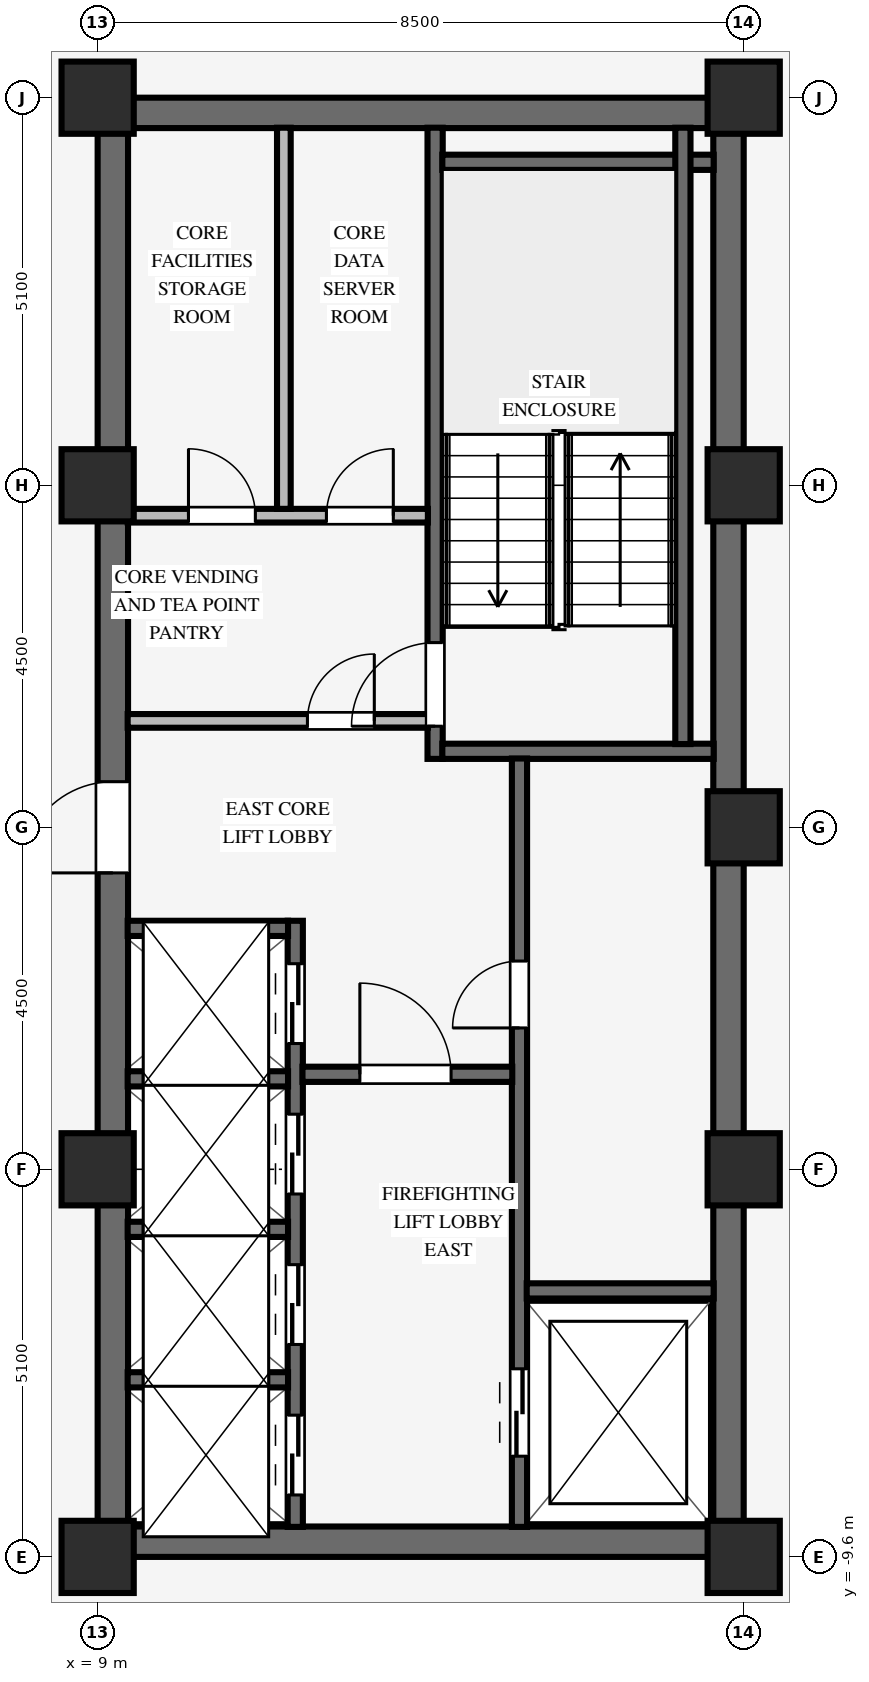
"""IFC4 building model, lengths in metres.
Left out: names, types, materials, properties, quantities, classifications, styles, units other than length and angle.
Written with IfcOpenShell. Run it as: python <this file> out.ifc"""

import sys

from ifc_helpers import new_model, si_unit, direction, frame, frame_2d, origin, origin_2d, place, context, subcontext, project, spatial, rectangle, extrude, source, transform, mapped, element, fill, save


model = new_model("IFC4")
c1 = context("Model", 3, precision=1e-05, world=origin(), true_north=direction((0.0, 1.0)))
c2 = subcontext(c1, "Body", "Model", "MODEL_VIEW")
j1 = project(units=[si_unit("LENGTHUNIT", "METRE"), si_unit("PLANEANGLEUNIT", "RADIAN")], contexts=[c1])
p1 = place(None, origin())
s1 = spatial("IfcSite", under=j1, at=p1, CompositionType="ELEMENT")
p2 = place(p1, origin())
s2 = spatial("IfcBuilding", under=s1, at=p2, CompositionType="ELEMENT")
p3 = place(p2, frame((0.0, 0.0, 174.95)))
s3 = spatial("IfcBuildingStorey", under=s2, at=p3, CompositionType="ELEMENT", Elevation=174.95)
for number, where, z_axis, x_axis in (
    (1, (9.0, -9.4, 0.0), (0.0, 0.0, 1.0), (1.0, 0.0, 0.0)),
    (2, (9.0, 9.4, 0.0), (0.0, 0.0, 1.0), (1.0, 0.0, 0.0)),
):
    element("IfcWall", number, at=place(p3, frame(where, z_axis=z_axis, x_axis=x_axis)), inside=s3, PredefinedType="SHEAR", context=c2, shape_type="SweptSolid", body=[
        extrude(rectangle(XDim=8.5, YDim=0.4, at=frame_2d((4.25, 0.0))), origin(), (0.0, 0.0, 1.0), 3.37),
    ])
p4 = place(p3, frame((9.2, -9.205, 0.0), z_axis=(0.0, 0.0, 1.0), x_axis=(0.0, 1.0, 0.0)))
e3 = element("IfcWall", 3, at=p4, inside=s3, PredefinedType="SHEAR", context=c2, shape_type="SweptSolid", body=[
    extrude(rectangle(XDim=18.41, YDim=0.4, at=frame_2d((9.205, 0.0))), origin(), (0.0, 0.0, 1.0), 3.37),
])
p5 = place(p4, frame((8.605, 0.0, 0.0)))
e4 = element("IfcOpeningElement", 4, at=p5, cuts=e3, PredefinedType="OPENING", context=c2, shape_type="SweptSolid", body=[
    extrude(rectangle(XDim=1.2, YDim=2.15, at=frame_2d((0.6, 1.075))), frame((0.0, 0.21, 0.0), z_axis=(0.0, -1.0, 0.0), x_axis=(1.0, 0.0, 0.0)), (0.0, 0.0, 1.0), 0.42),
])
p6 = place(p3, frame((17.3, -9.205, 0.0), z_axis=(0.0, 0.0, 1.0), x_axis=(0.0, 1.0, 0.0)))
e5 = element("IfcWall", 5, at=p6, inside=s3, PredefinedType="SHEAR", context=c2, shape_type="SweptSolid", body=[
    extrude(rectangle(XDim=18.41, YDim=0.4, at=frame_2d((9.205, 0.0))), origin(), (0.0, 0.0, 1.0), 3.37),
])
for number, where, z_axis, x_axis in (
    (6, (9.0, -9.6, 0.0), (0.0, 0.0, 1.0), (1.0, 0.0, 0.0)),
    (7, (9.0, -4.5, 0.0), (0.0, 0.0, 1.0), (1.0, 0.0, 0.0)),
    (8, (9.0, 4.5, 0.0), (0.0, 0.0, 1.0), (1.0, 0.0, 0.0)),
    (9, (9.0, 9.6, 0.0), (0.0, 0.0, 1.0), (1.0, 0.0, 0.0)),
    (10, (17.5, -9.6, 0.0), (0.0, 0.0, 1.0), (1.0, 0.0, 0.0)),
    (11, (17.5, -4.5, 0.0), (0.0, 0.0, 1.0), (1.0, 0.0, 0.0)),
    (12, (17.5, 4.5, 0.0), (0.0, 0.0, 1.0), (1.0, 0.0, 0.0)),
    (13, (17.5, 9.6, 0.0), (0.0, 0.0, 1.0), (1.0, 0.0, 0.0)),
    (14, (17.5, 0.0, 0.0), (0.0, 0.0, 1.0), (1.0, 0.0, 0.0)),
):
    element("IfcColumn", number, at=place(p3, frame(where, z_axis=z_axis, x_axis=x_axis)), inside=s3, PredefinedType="COLUMN", context=c2, shape_type="SweptSolid", body=[
        extrude(rectangle(XDim=0.95, YDim=0.95, at=origin_2d()), origin(), (0.0, 0.0, 1.0), 3.37),
    ])
p7 = place(p3, frame((13.44, 0.9, 0.0), z_axis=(0.0, 0.0, 1.0), x_axis=(0.0, 1.0, 0.0)))
e15 = element("IfcWall", 15, at=p7, inside=s3, PredefinedType="SHEAR", context=c2, shape_type="SweptSolid", body=[
    extrude(rectangle(XDim=8.305, YDim=0.2, at=frame_2d((4.153, 0.0))), origin(), (0.0, 0.0, 1.0), 3.37),
])
p8 = place(p7, frame((0.43, 0.0, 0.0)))
e16 = element("IfcOpeningElement", 16, at=p8, cuts=e15, PredefinedType="OPENING", context=c2, shape_type="SweptSolid", body=[
    extrude(rectangle(XDim=1.1, YDim=2.15, at=frame_2d((0.55, 1.075))), frame((0.0, 0.11, 0.0), z_axis=(0.0, -1.0, 0.0), x_axis=(1.0, 0.0, 0.0)), (0.0, 0.0, 1.0), 0.22),
])
for number, where, z_axis, x_axis in (
    (17, (13.535, 1.0, 0.0), (0.0, 0.0, 1.0), (1.0, 0.0, 0.0)),
    (18, (13.535, 8.75, 0.0), (0.0, 0.0, 1.0), (1.0, 0.0, 0.0)),
):
    element("IfcWall", number, at=place(p3, frame(where, z_axis=z_axis, x_axis=x_axis)), inside=s3, PredefinedType="SHEAR", context=c2, shape_type="SweptSolid", body=[
        extrude(rectangle(XDim=3.57, YDim=0.2, at=frame_2d((1.785, 0.0))), origin(), (0.0, 0.0, 1.0), 3.37),
    ])
p9 = place(p3, frame((16.7, 1.095, 0.0), z_axis=(0.0, 0.0, 1.0), x_axis=(0.0, 1.0, 0.0)))
e19 = element("IfcWall", 19, at=p9, inside=s3, PredefinedType="SHEAR", context=c2, shape_type="SweptSolid", body=[
    extrude(rectangle(XDim=8.11, YDim=0.2, at=frame_2d((4.055, 0.0))), origin(), (0.0, 0.0, 1.0), 3.37),
])
p10 = place(p3, frame((14.55, -9.205, 0.0), z_axis=(0.0, 0.0, 1.0), x_axis=(0.0, 1.0, 0.0)))
e20 = element("IfcWall", 20, at=p10, inside=s3, PredefinedType="SHEAR", context=c2, shape_type="SweptSolid", body=[
    extrude(rectangle(XDim=10.11, YDim=0.2, at=frame_2d((5.055, 0.0))), origin(), (0.0, 0.0, 1.0), 3.37),
])
p11 = place(p10, frame((6.565, 0.0, 0.0)))
e21 = element("IfcOpeningElement", 21, at=p11, cuts=e20, PredefinedType="OPENING", context=c2, shape_type="SweptSolid", body=[
    extrude(rectangle(XDim=0.88, YDim=2.1, at=frame_2d((0.44, 1.05))), frame((0.0, 0.11, 0.0), z_axis=(0.0, -1.0, 0.0), x_axis=(1.0, 0.0, 0.0)), (0.0, 0.0, 1.0), 0.22),
])
p12 = place(p10, frame((0.93, 0.0, 0.0)))
e22 = element("IfcOpeningElement", 22, at=p12, cuts=e20, PredefinedType="OPENING", context=c2, shape_type="SweptSolid", body=[
    extrude(rectangle(XDim=1.15, YDim=2.15, at=frame_2d((0.575, 1.075))), frame((0.0, 0.11, 0.0), z_axis=(0.0, -1.0, 0.0), x_axis=(1.0, 0.0, 0.0)), (0.0, 0.0, 1.0), 0.22),
])
p13 = place(p3, frame((14.645, -6.1, 0.0), z_axis=(0.0, 0.0, 1.0), x_axis=(1.0, 0.0, 0.0)))
e23 = element("IfcWall", 23, at=p13, inside=s3, PredefinedType="SHEAR", context=c2, shape_type="SweptSolid", body=[
    extrude(rectangle(XDim=2.46, YDim=0.2, at=frame_2d((1.23, 0.0))), origin(), (0.0, 0.0, 1.0), 3.37),
])
p14 = place(p3, frame((11.6, -9.205, 0.0), z_axis=(0.0, 0.0, 1.0), x_axis=(0.0, 1.0, 0.0)))
e24 = element("IfcWall", 24, at=p14, inside=s3, PredefinedType="SHEAR", context=c2, shape_type="SweptSolid", body=[
    extrude(rectangle(XDim=7.975, YDim=0.2, at=frame_2d((3.988, 0.0))), origin(), (0.0, 0.0, 1.0), 3.37),
])
p15 = place(p14, frame((0.42, 0.0, 0.0)))
e25 = element("IfcOpeningElement", 25, at=p15, cuts=e24, PredefinedType="OPENING", context=c2, shape_type="SweptSolid", body=[
    extrude(rectangle(XDim=1.05, YDim=2.15, at=frame_2d((0.525, 1.075))), frame((0.0, 0.11, 0.0), z_axis=(0.0, -1.0, 0.0), x_axis=(1.0, 0.0, 0.0)), (0.0, 0.0, 1.0), 0.22),
])
p16 = place(p14, frame((2.4, 0.0, 0.0)))
e26 = element("IfcOpeningElement", 26, at=p16, cuts=e24, PredefinedType="OPENING", context=c2, shape_type="SweptSolid", body=[
    extrude(rectangle(XDim=1.05, YDim=2.15, at=frame_2d((0.525, 1.075))), frame((0.0, 0.11, 0.0), z_axis=(0.0, -1.0, 0.0), x_axis=(1.0, 0.0, 0.0)), (0.0, 0.0, 1.0), 0.22),
])
p17 = place(p14, frame((4.38, 0.0, 0.0)))
e27 = element("IfcOpeningElement", 27, at=p17, cuts=e24, PredefinedType="OPENING", context=c2, shape_type="SweptSolid", body=[
    extrude(rectangle(XDim=1.05, YDim=2.15, at=frame_2d((0.525, 1.075))), frame((0.0, 0.11, 0.0), z_axis=(0.0, -1.0, 0.0), x_axis=(1.0, 0.0, 0.0)), (0.0, 0.0, 1.0), 0.22),
])
p18 = place(p14, frame((6.36, 0.0, 0.0)))
e28 = element("IfcOpeningElement", 28, at=p18, cuts=e24, PredefinedType="OPENING", context=c2, shape_type="SweptSolid", body=[
    extrude(rectangle(XDim=1.05, YDim=2.15, at=frame_2d((0.525, 1.075))), frame((0.0, 0.11, 0.0), z_axis=(0.0, -1.0, 0.0), x_axis=(1.0, 0.0, 0.0)), (0.0, 0.0, 1.0), 0.22),
])
p19 = place(p3, frame((11.695, -3.25, 0.0), z_axis=(0.0, 0.0, 1.0), x_axis=(1.0, 0.0, 0.0)))
e29 = element("IfcWall", 29, at=p19, inside=s3, PredefinedType="SHEAR", context=c2, shape_type="SweptSolid", body=[
    extrude(rectangle(XDim=2.76, YDim=0.2, at=frame_2d((1.38, 0.0))), origin(), (0.0, 0.0, 1.0), 3.37),
])
p20 = place(p19, frame((0.755, 0.0, 0.0)))
e30 = element("IfcOpeningElement", 30, at=p20, cuts=e29, PredefinedType="OPENING", context=c2, shape_type="SweptSolid", body=[
    extrude(rectangle(XDim=1.2, YDim=2.15, at=frame_2d((0.6, 1.075))), frame((0.0, 0.11, 0.0), z_axis=(0.0, -1.0, 0.0), x_axis=(1.0, 0.0, 0.0)), (0.0, 0.0, 1.0), 0.22),
])
for number, where, z_axis, x_axis in (
    (31, (9.395, -7.27, 0.0), (0.0, 0.0, 1.0), (1.0, 0.0, 0.0)),
    (32, (9.395, -5.29, 0.0), (0.0, 0.0, 1.0), (1.0, 0.0, 0.0)),
    (33, (9.395, -3.31, 0.0), (0.0, 0.0, 1.0), (1.0, 0.0, 0.0)),
    (34, (9.395, -1.33, 0.0), (0.0, 0.0, 1.0), (1.0, 0.0, 0.0)),
):
    element("IfcWall", number, at=place(p3, frame(where, z_axis=z_axis, x_axis=x_axis)), inside=s3, PredefinedType="SHEAR", context=c2, shape_type="SweptSolid", body=[
        extrude(rectangle(XDim=2.11, YDim=0.2, at=frame_2d((1.055, 0.0))), origin(), (0.0, 0.0, 1.0), 3.37),
    ])
p21 = place(p3, frame((9.395, 1.4, 0.0), z_axis=(0.0, 0.0, 1.0), x_axis=(1.0, 0.0, 0.0)))
e35 = element("IfcWall", 35, at=p21, inside=s3, PredefinedType="PARTITIONING", context=c2, shape_type="SweptSolid", body=[
    extrude(rectangle(XDim=3.95, YDim=0.18, at=frame_2d((1.975, 0.0))), origin(), (0.0, 0.0, 1.0), 3.36),
])
p22 = place(p21, frame((2.365, 0.0, 0.0)))
e36 = element("IfcOpeningElement", 36, at=p22, cuts=e35, PredefinedType="OPENING", context=c2, shape_type="SweptSolid", body=[
    extrude(rectangle(XDim=0.88, YDim=2.1, at=frame_2d((0.44, 1.05))), frame((0.0, 0.1, 0.0), z_axis=(0.0, -1.0, 0.0), x_axis=(1.0, 0.0, 0.0)), (0.0, 0.0, 1.0), 0.2),
])
p23 = place(p3, frame((9.395, 4.1, 0.0), z_axis=(0.0, 0.0, 1.0), x_axis=(1.0, 0.0, 0.0)))
e37 = element("IfcWall", 37, at=p23, inside=s3, PredefinedType="PARTITIONING", context=c2, shape_type="SweptSolid", body=[
    extrude(rectangle(XDim=3.95, YDim=0.18, at=frame_2d((1.975, 0.0))), origin(), (0.0, 0.0, 1.0), 3.36),
])
p24 = place(p23, frame((0.8, 0.0, 0.0)))
e38 = element("IfcOpeningElement", 38, at=p24, cuts=e37, PredefinedType="OPENING", context=c2, shape_type="SweptSolid", body=[
    extrude(rectangle(XDim=0.88, YDim=2.1, at=frame_2d((0.44, 1.05))), frame((0.0, 0.1, 0.0), z_axis=(0.0, -1.0, 0.0), x_axis=(1.0, 0.0, 0.0)), (0.0, 0.0, 1.0), 0.2),
])
p25 = place(p23, frame((2.615, 0.0, 0.0)))
e39 = element("IfcOpeningElement", 39, at=p25, cuts=e37, PredefinedType="OPENING", context=c2, shape_type="SweptSolid", body=[
    extrude(rectangle(XDim=0.88, YDim=2.1, at=frame_2d((0.44, 1.05))), frame((0.0, 0.1, 0.0), z_axis=(0.0, -1.0, 0.0), x_axis=(1.0, 0.0, 0.0)), (0.0, 0.0, 1.0), 0.2),
])
p26 = place(p3, frame((11.45, 4.19, 0.0), z_axis=(0.0, 0.0, 1.0), x_axis=(0.0, 1.0, 0.0)))
e40 = element("IfcWall", 40, at=p26, inside=s3, PredefinedType="PARTITIONING", context=c2, shape_type="SweptSolid", body=[
    extrude(rectangle(XDim=5.015, YDim=0.18, at=frame_2d((2.508, 0.0))), origin(), (0.0, 0.0, 1.0), 3.36),
])
m1 = source(origin(), c2, "Body", "SweptSolid", [
    extrude(rectangle(XDim=1.1, YDim=2.15, at=frame_2d((0.55, 1.075))), frame((0.0, 0.025, 0.0), z_axis=(0.0, -1.0, 0.0), x_axis=(1.0, 0.0, 0.0)), (0.0, 0.0, 1.0), 0.05),
])
p27 = place(p8, origin())
e41 = element("IfcDoor", 41, at=p27, inside=s3, OperationType="SINGLE_SWING_LEFT", PredefinedType="DOOR", context=c2, shape_type="MappedRepresentation", body=[
    mapped(m1, transform((0.0, 0.0, 0.0), scale=1.0)),
])
fill(e16, e41)
m2 = source(origin(), c2, "Body", "SweptSolid", [
    extrude(rectangle(XDim=0.88, YDim=2.1, at=frame_2d((0.44, 1.05))), frame((0.0, 0.025, 0.0), z_axis=(0.0, -1.0, 0.0), x_axis=(1.0, 0.0, 0.0)), (0.0, 0.0, 1.0), 0.05),
])
p28 = place(p11, origin())
e42 = element("IfcDoor", 42, at=p28, inside=s3, OperationType="SINGLE_SWING_LEFT", PredefinedType="DOOR", context=c2, shape_type="MappedRepresentation", body=[
    mapped(m2, transform((0.0, 0.0, 0.0), scale=1.0)),
])
fill(e21, e42)
m3 = source(origin(), c2, "Body", "SweptSolid", [
    extrude(rectangle(XDim=1.2, YDim=2.15, at=frame_2d((0.6, 1.075))), frame((0.0, 0.025, 0.0), z_axis=(0.0, -1.0, 0.0), x_axis=(1.0, 0.0, 0.0)), (0.0, 0.0, 1.0), 0.05),
])
p29 = place(p20, origin())
e43 = element("IfcDoor", 43, at=p29, inside=s3, OperationType="SINGLE_SWING_LEFT", PredefinedType="DOOR", context=c2, shape_type="MappedRepresentation", body=[
    mapped(m3, transform((0.0, 0.0, 0.0), scale=1.0)),
])
fill(e30, e43)
p30 = place(p5, origin())
e44 = element("IfcDoor", 44, at=p30, inside=s3, OperationType="SINGLE_SWING_LEFT", PredefinedType="DOOR", context=c2, shape_type="MappedRepresentation", body=[
    mapped(m3, transform((0.0, 0.0, 0.0), scale=1.0)),
])
fill(e4, e44)
p31 = place(p22, origin())
e45 = element("IfcDoor", 45, at=p31, inside=s3, OperationType="SINGLE_SWING_RIGHT", PredefinedType="DOOR", context=c2, shape_type="MappedRepresentation", body=[
    mapped(m2, transform((0.0, 0.0, 0.0), scale=1.0)),
])
fill(e36, e45)
p32 = place(p24, origin())
e46 = element("IfcDoor", 46, at=p32, inside=s3, OperationType="SINGLE_SWING_LEFT", PredefinedType="DOOR", context=c2, shape_type="MappedRepresentation", body=[
    mapped(m2, transform((0.0, 0.0, 0.0), scale=1.0)),
])
fill(e38, e46)
p33 = place(p25, origin())
e47 = element("IfcDoor", 47, at=p33, inside=s3, OperationType="SINGLE_SWING_RIGHT", PredefinedType="DOOR", context=c2, shape_type="MappedRepresentation", body=[
    mapped(m2, transform((0.0, 0.0, 0.0), scale=1.0)),
])
fill(e39, e47)
m4 = source(origin(), c2, "Body", "SweptSolid", [
    extrude(rectangle(XDim=1.15, YDim=2.15, at=frame_2d((0.575, 1.075))), frame((0.0, 0.025, 0.0), z_axis=(0.0, -1.0, 0.0), x_axis=(1.0, 0.0, 0.0)), (0.0, 0.0, 1.0), 0.05),
])
p34 = place(p12, origin())
e48 = element("IfcDoor", 48, at=p34, inside=s3, OperationType="DOUBLE_DOOR_SLIDING", PredefinedType="DOOR", context=c2, shape_type="MappedRepresentation", body=[
    mapped(m4, transform((0.0, 0.0, 0.0), scale=1.0)),
])
fill(e22, e48)
m5 = source(origin(), c2, "Body", "SweptSolid", [
    extrude(rectangle(XDim=1.05, YDim=2.15, at=frame_2d((0.525, 1.075))), frame((0.0, 0.025, 0.0), z_axis=(0.0, -1.0, 0.0), x_axis=(1.0, 0.0, 0.0)), (0.0, 0.0, 1.0), 0.05),
])
p35 = place(p15, origin())
e49 = element("IfcDoor", 49, at=p35, inside=s3, OperationType="DOUBLE_DOOR_SLIDING", PredefinedType="DOOR", context=c2, shape_type="MappedRepresentation", body=[
    mapped(m5, transform((0.0, 0.0, 0.0), scale=1.0)),
])
fill(e25, e49)
p36 = place(p16, origin())
e50 = element("IfcDoor", 50, at=p36, inside=s3, OperationType="DOUBLE_DOOR_SLIDING", PredefinedType="DOOR", context=c2, shape_type="MappedRepresentation", body=[
    mapped(m5, transform((0.0, 0.0, 0.0), scale=1.0)),
])
fill(e26, e50)
p37 = place(p17, origin())
e51 = element("IfcDoor", 51, at=p37, inside=s3, OperationType="DOUBLE_DOOR_SLIDING", PredefinedType="DOOR", context=c2, shape_type="MappedRepresentation", body=[
    mapped(m5, transform((0.0, 0.0, 0.0), scale=1.0)),
])
fill(e27, e51)
p38 = place(p18, origin())
e52 = element("IfcDoor", 52, at=p38, inside=s3, OperationType="DOUBLE_DOOR_SLIDING", PredefinedType="DOOR", context=c2, shape_type="MappedRepresentation", body=[
    mapped(m5, transform((0.0, 0.0, 0.0), scale=1.0)),
])
fill(e28, e52)
save(model, sys.argv[1])
